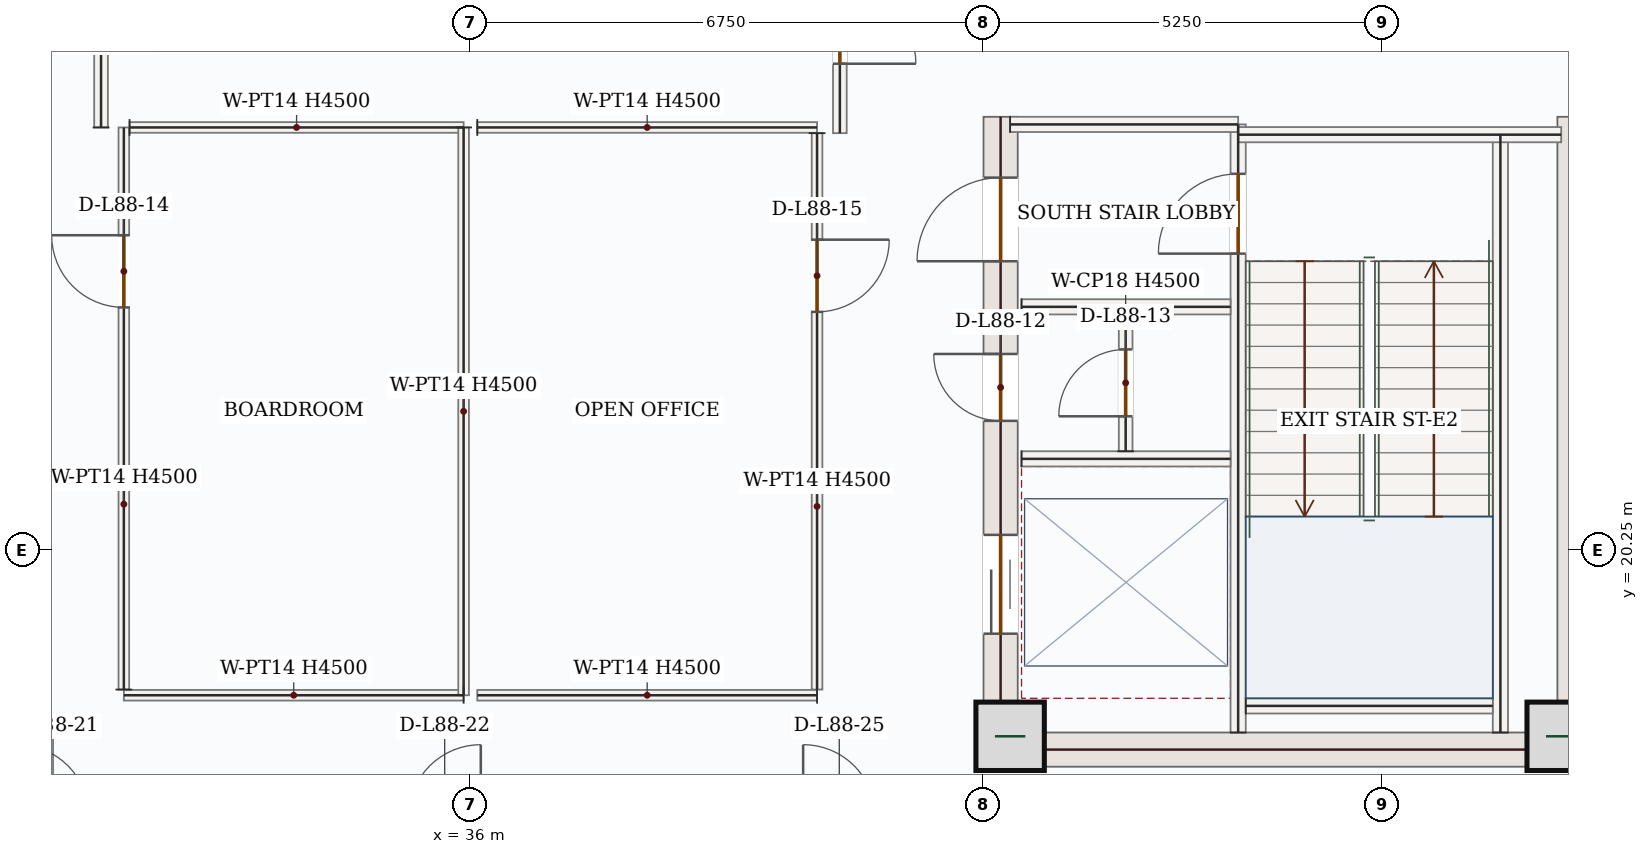
"""IFC4 building model, lengths in metres.
Left out: names, types, materials, properties, quantities, classifications, styles, units other than length and angle.
Written with IfcOpenShell. Run it as: python <this file> out.ifc"""

import sys

from ifc_helpers import new_model, si_unit, direction, frame, frame_2d, origin, origin_2d, place, context, subcontext, project, spatial, rectangle, extrude, source, transform, mapped, element, fill, save


model = new_model("IFC4")
c1 = context("Model", 3, precision=1e-05, world=origin(), true_north=direction((0.0, 1.0)))
c2 = subcontext(c1, "Body", "Model", "MODEL_VIEW")
j1 = project(units=[si_unit("LENGTHUNIT", "METRE"), si_unit("PLANEANGLEUNIT", "RADIAN")], contexts=[c1])
p1 = place(None, origin())
s1 = spatial("IfcSite", under=j1, at=p1, CompositionType="ELEMENT")
p2 = place(p1, origin())
s2 = spatial("IfcBuilding", under=s1, at=p2, CompositionType="ELEMENT")
p3 = place(p2, frame((0.0, 0.0, 361.05)))
s3 = spatial("IfcBuildingStorey", under=s2, at=p3, CompositionType="ELEMENT", Elevation=361.05)
p4 = place(p3, frame((42.975, 17.4, 0.0), z_axis=(0.0, 0.0, 1.0), x_axis=(0.0, 1.0, 0.0)))
e1 = element("IfcWall", 1, at=p4, inside=s3, PredefinedType="SHEAR", context=c2, shape_type="SweptSolid", body=[
    extrude(rectangle(XDim=8.55, YDim=0.45, at=frame_2d((4.275, 0.0))), origin(), (0.0, 0.0, 1.0), 4.5),
])
p5 = place(p4, frame((6.65, 0.0, 0.0)))
e2 = element("IfcOpeningElement", 2, at=p5, cuts=e1, PredefinedType="OPENING", context=c2, shape_type="SweptSolid", body=[
    extrude(rectangle(XDim=1.1, YDim=2.2, at=frame_2d((0.55, 1.1))), frame((0.0, 0.235, 0.0), z_axis=(0.0, -1.0, 0.0), x_axis=(1.0, 0.0, 0.0)), (0.0, 0.0, 1.0), 0.47),
])
p6 = place(p4, frame((1.75, 0.0, 0.0)))
e3 = element("IfcOpeningElement", 3, at=p6, cuts=e1, PredefinedType="OPENING", context=c2, shape_type="SweptSolid", body=[
    extrude(rectangle(XDim=1.3, YDim=2.2, at=frame_2d((0.65, 1.1))), frame((0.0, 0.235, 0.0), z_axis=(0.0, -1.0, 0.0), x_axis=(1.0, 0.0, 0.0)), (0.0, 0.0, 1.0), 0.47),
])
p7 = place(p4, frame((4.55, 0.0, 0.0)))
e4 = element("IfcOpeningElement", 4, at=p7, cuts=e1, PredefinedType="OPENING", context=c2, shape_type="SweptSolid", body=[
    extrude(rectangle(XDim=0.88, YDim=2.1, at=frame_2d((0.44, 1.05))), frame((0.0, 0.235, 0.0), z_axis=(0.0, -1.0, 0.0), x_axis=(1.0, 0.0, 0.0)), (0.0, 0.0, 1.0), 0.47),
])
m1 = source(origin(), c2, "Body", "SweptSolid", [
    extrude(rectangle(XDim=8.55, YDim=0.45, at=frame_2d((4.275, 0.0))), origin(), (0.0, 0.0, 1.0), 4.5),
])
p8 = place(p3, frame((50.525, 17.4, 0.0), z_axis=(0.0, 0.0, 1.0), x_axis=(0.0, 1.0, 0.0)))
e5 = element("IfcWall", 5, at=p8, inside=s3, PredefinedType="SHEAR", context=c2, shape_type="MappedRepresentation", body=[
    mapped(m1, transform((0.0, 0.0, 0.0), x_axis=(1.0, 0.0, 0.0), y_axis=(0.0, 1.0, 0.0), z_axis=(0.0, 0.0, 1.0), scale=1.0)),
])
m2 = source(origin(), c2, "Body", "SweptSolid", [
    extrude(rectangle(XDim=7.1, YDim=0.45, at=frame_2d((3.55, 0.0))), origin(), (0.0, 0.0, 1.0), 4.5),
])
p9 = place(p3, frame((43.2, 17.625, 0.0), z_axis=(0.0, 0.0, 1.0), x_axis=(1.0, 0.0, 0.0)))
e6 = element("IfcWall", 6, at=p9, inside=s3, PredefinedType="SHEAR", context=c2, shape_type="MappedRepresentation", body=[
    mapped(m2, transform((0.0, 0.0, 0.0), x_axis=(1.0, 0.0, 0.0), y_axis=(0.0, 1.0, 0.0), z_axis=(0.0, 0.0, 1.0), scale=1.0)),
])
m3 = source(origin(), c2, "Body", "SweptSolid", [
    extrude(rectangle(XDim=0.9, YDim=0.9, at=origin_2d()), origin(), (0.0, 0.0, 1.0), 4.8),
])
for number, where, z_axis, x_axis in (
    (7, (43.1, 17.8, 0.0), (0.0, 0.0, 1.0), (1.0, 0.0, 0.0)),
    (8, (50.35, 17.8, 0.0), (0.0, 0.0, 1.0), (1.0, 0.0, 0.0)),
):
    element("IfcColumn", number, at=place(p3, frame(where, z_axis=z_axis, x_axis=x_axis)), inside=s3, PredefinedType="COLUMN", context=c2, shape_type="MappedRepresentation", body=[
        mapped(m3, transform((0.0, 0.0, 0.0), x_axis=(1.0, 0.0, 0.0), y_axis=(0.0, 1.0, 0.0), z_axis=(0.0, 0.0, 1.0), scale=1.0)),
    ])
m4 = source(origin(), c2, "Body", "SweptSolid", [
    extrude(rectangle(XDim=7.87, YDim=0.2, at=frame_2d((3.935, 0.0))), origin(), (0.0, 0.0, 1.0), 4.5),
])
p10 = place(p3, frame((49.55, 17.85, 0.0), z_axis=(0.0, 0.0, 1.0), x_axis=(0.0, 1.0, 0.0)))
e9 = element("IfcWall", 9, at=p10, inside=s3, PredefinedType="SOLIDWALL", context=c2, shape_type="MappedRepresentation", body=[
    mapped(m4, transform((0.0, 0.0, 0.0), x_axis=(1.0, 0.0, 0.0), y_axis=(0.0, 1.0, 0.0), z_axis=(0.0, 0.0, 1.0), scale=1.0)),
])
p11 = place(p3, frame((46.1, 17.85, 0.0), z_axis=(0.0, 0.0, 1.0), x_axis=(0.0, 1.0, 0.0)))
e10 = element("IfcWall", 10, at=p11, inside=s3, PredefinedType="SOLIDWALL", context=c2, shape_type="SweptSolid", body=[
    extrude(rectangle(XDim=8.0, YDim=0.2, at=frame_2d((4.0, 0.0))), origin(), (0.0, 0.0, 1.0), 4.5),
])
p12 = place(p11, frame((6.3, 0.0, 0.0)))
e11 = element("IfcOpeningElement", 11, at=p12, cuts=e10, PredefinedType="OPENING", context=c2, shape_type="SweptSolid", body=[
    extrude(rectangle(XDim=1.05, YDim=2.15, at=frame_2d((0.525, 1.075))), frame((0.0, 0.11, 0.0), z_axis=(0.0, -1.0, 0.0), x_axis=(1.0, 0.0, 0.0)), (0.0, 0.0, 1.0), 0.22),
])
m5 = source(origin(), c2, "Body", "SweptSolid", [
    extrude(rectangle(XDim=3.0, YDim=0.2, at=frame_2d((1.5, 0.0))), origin(), (0.0, 0.0, 1.0), 4.5),
])
p13 = place(p3, frame((43.1, 25.85, 0.0), z_axis=(0.0, 0.0, 1.0), x_axis=(1.0, 0.0, 0.0)))
e12 = element("IfcWall", 12, at=p13, inside=s3, PredefinedType="SOLIDWALL", context=c2, shape_type="MappedRepresentation", body=[
    mapped(m5, transform((0.0, 0.0, 0.0), x_axis=(1.0, 0.0, 0.0), y_axis=(0.0, 1.0, 0.0), z_axis=(0.0, 0.0, 1.0), scale=1.0)),
])
m6 = source(origin(), c2, "Body", "SweptSolid", [
    extrude(rectangle(XDim=4.25, YDim=0.2, at=frame_2d((2.125, 0.0))), origin(), (0.0, 0.0, 1.0), 4.5),
])
p14 = place(p3, frame((46.1, 25.715, 0.0), z_axis=(0.0, 0.0, 1.0), x_axis=(1.0, 0.0, 0.0)))
e13 = element("IfcWall", 13, at=p14, inside=s3, PredefinedType="SOLIDWALL", context=c2, shape_type="MappedRepresentation", body=[
    mapped(m6, transform((0.0, 0.0, 0.0), x_axis=(1.0, 0.0, 0.0), y_axis=(0.0, 1.0, 0.0), z_axis=(0.0, 0.0, 1.0), scale=1.0)),
])
m7 = source(origin(), c2, "Body", "SweptSolid", [
    extrude(rectangle(XDim=3.25, YDim=0.2, at=frame_2d((1.625, 0.0))), origin(), (0.0, 0.0, 1.0), 4.5),
])
p15 = place(p3, frame((46.2, 18.2, 0.0), z_axis=(0.0, 0.0, 1.0), x_axis=(1.0, 0.0, 0.0)))
e14 = element("IfcWall", 14, at=p15, inside=s3, PredefinedType="SOLIDWALL", context=c2, shape_type="MappedRepresentation", body=[
    mapped(m7, transform((0.0, 0.0, 0.0), x_axis=(1.0, 0.0, 0.0), y_axis=(0.0, 1.0, 0.0), z_axis=(0.0, 0.0, 1.0), scale=1.0)),
])
m8 = source(origin(), c2, "Body", "SweptSolid", [
    extrude(rectangle(XDim=2.75, YDim=0.2, at=frame_2d((1.375, 0.0))), origin(), (0.0, 0.0, 1.0), 4.5),
])
for number, where, z_axis, x_axis in (
    (15, (43.25, 23.45, 0.0), (0.0, 0.0, 1.0), (1.0, 0.0, 0.0)),
    (16, (43.25, 21.45, 0.0), (0.0, 0.0, 1.0), (1.0, 0.0, 0.0)),
):
    element("IfcWall", number, at=place(p3, frame(where, z_axis=z_axis, x_axis=x_axis)), inside=s3, PredefinedType="SOLIDWALL", context=c2, shape_type="MappedRepresentation", body=[
        mapped(m8, transform((0.0, 0.0, 0.0), x_axis=(1.0, 0.0, 0.0), y_axis=(0.0, 1.0, 0.0), z_axis=(0.0, 0.0, 1.0), scale=1.0)),
    ])
p16 = place(p3, frame((44.62, 21.55, 0.0), z_axis=(0.0, 0.0, 1.0), x_axis=(0.0, 1.0, 0.0)))
e17 = element("IfcWall", 17, at=p16, inside=s3, PredefinedType="PARTITIONING", context=c2, shape_type="SweptSolid", body=[
    extrude(rectangle(XDim=1.8, YDim=0.18, at=frame_2d((0.9, 0.0))), origin(), (0.0, 0.0, 1.0), 4.5),
])
p17 = place(p16, frame((0.46, 0.0, 0.0)))
e18 = element("IfcOpeningElement", 18, at=p17, cuts=e17, PredefinedType="OPENING", context=c2, shape_type="SweptSolid", body=[
    extrude(rectangle(XDim=0.88, YDim=2.1, at=frame_2d((0.44, 1.05))), frame((0.0, 0.1, 0.0), z_axis=(0.0, -1.0, 0.0), x_axis=(1.0, 0.0, 0.0)), (0.0, 0.0, 1.0), 0.2),
])
m9 = source(origin(), c2, "Body", "SweptSolid", [
    extrude(rectangle(XDim=4.47, YDim=0.14, at=frame_2d((2.235, 0.0))), origin(), (0.0, 0.0, 1.0), 4.5),
])
p18 = place(p3, frame((35.91, 18.34, 0.0), z_axis=(0.0, 0.0, 1.0), x_axis=(-1.0, 0.0, 0.0)))
e19 = element("IfcWall", 19, at=p18, inside=s3, PredefinedType="PARTITIONING", context=c2, shape_type="MappedRepresentation", body=[
    mapped(m9, transform((0.0, 0.0, 0.0), x_axis=(1.0, 0.0, 0.0), y_axis=(0.0, 1.0, 0.0), z_axis=(0.0, 0.0, 1.0), scale=1.0)),
])
p19 = place(p3, frame((31.44, 18.415, 0.0), z_axis=(0.0, 0.0, 1.0), x_axis=(0.0, 1.0, 0.0)))
e20 = element("IfcWall", 20, at=p19, inside=s3, PredefinedType="PARTITIONING", context=c2, shape_type="SweptSolid", body=[
    extrude(rectangle(XDim=7.395, YDim=0.14, at=frame_2d((3.698, 0.0))), origin(), (0.0, 0.0, 1.0), 4.5),
])
p20 = place(p19, frame((5.027, 0.0, 0.0)))
e21 = element("IfcOpeningElement", 21, at=p20, cuts=e20, PredefinedType="OPENING", context=c2, shape_type="SweptSolid", body=[
    extrude(rectangle(XDim=0.95, YDim=2.15, at=frame_2d((0.475, 1.075))), frame((0.0, 0.08, 0.0), z_axis=(0.0, -1.0, 0.0), x_axis=(1.0, 0.0, 0.0)), (0.0, 0.0, 1.0), 0.16),
])
m10 = source(origin(), c2, "Body", "SweptSolid", [
    extrude(rectangle(XDim=4.395, YDim=0.14, at=frame_2d((2.198, 0.0))), origin(), (0.0, 0.0, 1.0), 4.5),
])
p21 = place(p3, frame((31.515, 25.81, 0.0), z_axis=(0.0, 0.0, 1.0), x_axis=(1.0, 0.0, 0.0)))
e22 = element("IfcWall", 22, at=p21, inside=s3, PredefinedType="PARTITIONING", context=c2, shape_type="MappedRepresentation", body=[
    mapped(m10, transform((0.0, 0.0, 0.0), x_axis=(1.0, 0.0, 0.0), y_axis=(0.0, 1.0, 0.0), z_axis=(0.0, 0.0, 1.0), scale=1.0)),
])
m11 = source(origin(), c2, "Body", "SweptSolid", [
    extrude(rectangle(XDim=7.47, YDim=0.14, at=frame_2d((3.735, 0.0))), origin(), (0.0, 0.0, 1.0), 4.5),
])
p22 = place(p3, frame((35.91, 25.81, 0.0), z_axis=(0.0, 0.0, 1.0), x_axis=(0.0, -1.0, 0.0)))
e23 = element("IfcWall", 23, at=p22, inside=s3, PredefinedType="PARTITIONING", context=c2, shape_type="MappedRepresentation", body=[
    mapped(m11, transform((0.0, 0.0, 0.0), x_axis=(1.0, 0.0, 0.0), y_axis=(0.0, 1.0, 0.0), z_axis=(0.0, 0.0, 1.0), scale=1.0)),
])
for number, where, z_axis, x_axis in (
    (24, (40.56, 18.34, 0.0), (0.0, 0.0, 1.0), (-1.0, 0.0, 0.0)),
    (25, (36.09, 25.81, 0.0), (0.0, 0.0, 1.0), (1.0, 0.0, 0.0)),
):
    element("IfcWall", number, at=place(p3, frame(where, z_axis=z_axis, x_axis=x_axis)), inside=s3, PredefinedType="PARTITIONING", context=c2, shape_type="MappedRepresentation", body=[
        mapped(m9, transform((0.0, 0.0, 0.0), x_axis=(1.0, 0.0, 0.0), y_axis=(0.0, 1.0, 0.0), z_axis=(0.0, 0.0, 1.0), scale=1.0)),
    ])
p23 = place(p3, frame((40.56, 25.735, 0.0), z_axis=(0.0, 0.0, 1.0), x_axis=(0.0, -1.0, 0.0)))
e26 = element("IfcWall", 26, at=p23, inside=s3, PredefinedType="PARTITIONING", context=c2, shape_type="SweptSolid", body=[
    extrude(rectangle(XDim=7.32, YDim=0.14, at=frame_2d((3.66, 0.0))), origin(), (0.0, 0.0, 1.0), 4.5),
])
p24 = place(p23, frame((1.401, 0.0, 0.0)))
e27 = element("IfcOpeningElement", 27, at=p24, cuts=e26, PredefinedType="OPENING", context=c2, shape_type="SweptSolid", body=[
    extrude(rectangle(XDim=0.95, YDim=2.15, at=frame_2d((0.475, 1.075))), frame((0.0, 0.08, 0.0), z_axis=(0.0, -1.0, 0.0), x_axis=(1.0, 0.0, 0.0)), (0.0, 0.0, 1.0), 0.16),
])
m12 = source(origin(), c2, "Body", "SweptSolid", [
    extrude(rectangle(XDim=5.14, YDim=0.18, at=frame_2d((2.57, 0.0))), origin(), (0.0, 0.0, 1.0), 4.5),
])
p25 = place(p3, frame((31.14, 25.81, 0.0), z_axis=(0.0, 0.0, 1.0), x_axis=(0.0, 1.0, 0.0)))
e28 = element("IfcWall", 28, at=p25, inside=s3, PredefinedType="PARTITIONING", context=c2, shape_type="MappedRepresentation", body=[
    mapped(m12, transform((0.0, 0.0, 0.0), x_axis=(1.0, 0.0, 0.0), y_axis=(0.0, 1.0, 0.0), z_axis=(0.0, 0.0, 1.0), scale=1.0)),
])
p26 = place(p3, frame((40.86, 30.95, 0.0), z_axis=(0.0, 0.0, 1.0), x_axis=(0.0, -1.0, 0.0)))
e29 = element("IfcWall", 29, at=p26, inside=s3, PredefinedType="PARTITIONING", context=c2, shape_type="SweptSolid", body=[
    extrude(rectangle(XDim=5.215, YDim=0.18, at=frame_2d((2.607, 0.0))), origin(), (0.0, 0.0, 1.0), 4.5),
])
p27 = place(p26, frame((3.302, 0.0, 0.0)))
e30 = element("IfcOpeningElement", 30, at=p27, cuts=e29, PredefinedType="OPENING", context=c2, shape_type="SweptSolid", body=[
    extrude(rectangle(XDim=1.0, YDim=2.15, at=frame_2d((0.5, 1.075))), frame((0.0, 0.1, 0.0), z_axis=(0.0, -1.0, 0.0), x_axis=(1.0, 0.0, 0.0)), (0.0, 0.0, 1.0), 0.2),
])
m13 = source(origin(), c2, "Body", "SweptSolid", [
    extrude(rectangle(XDim=1.05, YDim=2.15, at=frame_2d((0.525, 1.075))), frame((0.0, 0.025, 0.0), z_axis=(0.0, -1.0, 0.0), x_axis=(1.0, 0.0, 0.0)), (0.0, 0.0, 1.0), 0.05),
])
p28 = place(p12, origin())
e31 = element("IfcDoor", 31, at=p28, inside=s3, OperationType="SINGLE_SWING_LEFT", PredefinedType="DOOR", context=c2, shape_type="MappedRepresentation", body=[
    mapped(m13, transform((0.0, 0.0, 0.0), x_axis=(1.0, 0.0, 0.0), y_axis=(0.0, 1.0, 0.0), z_axis=(0.0, 0.0, 1.0), scale=1.0)),
])
fill(e11, e31)
m14 = source(origin(), c2, "Body", "SweptSolid", [
    extrude(rectangle(XDim=1.1, YDim=2.2, at=frame_2d((0.55, 1.1))), frame((0.0, 0.025, 0.0), z_axis=(0.0, -1.0, 0.0), x_axis=(1.0, 0.0, 0.0)), (0.0, 0.0, 1.0), 0.05),
])
p29 = place(p5, origin())
e32 = element("IfcDoor", 32, at=p29, inside=s3, OperationType="SINGLE_SWING_LEFT", PredefinedType="DOOR", context=c2, shape_type="MappedRepresentation", body=[
    mapped(m14, transform((0.0, 0.0, 0.0), x_axis=(1.0, 0.0, 0.0), y_axis=(0.0, 1.0, 0.0), z_axis=(0.0, 0.0, 1.0), scale=1.0)),
])
fill(e2, e32)
m15 = source(origin(), c2, "Body", "SweptSolid", [
    extrude(rectangle(XDim=1.3, YDim=2.2, at=frame_2d((0.65, 1.1))), frame((0.0, 0.025, 0.0), z_axis=(0.0, -1.0, 0.0), x_axis=(1.0, 0.0, 0.0)), (0.0, 0.0, 1.0), 0.05),
])
p30 = place(p6, origin())
e33 = element("IfcDoor", 33, at=p30, inside=s3, OperationType="DOUBLE_DOOR_SLIDING", PredefinedType="DOOR", context=c2, shape_type="MappedRepresentation", body=[
    mapped(m15, transform((0.0, 0.0, 0.0), x_axis=(1.0, 0.0, 0.0), y_axis=(0.0, 1.0, 0.0), z_axis=(0.0, 0.0, 1.0), scale=1.0)),
])
fill(e3, e33)
m16 = source(origin(), c2, "Body", "SweptSolid", [
    extrude(rectangle(XDim=0.88, YDim=2.1, at=frame_2d((0.44, 1.05))), frame((0.0, 0.025, 0.0), z_axis=(0.0, -1.0, 0.0), x_axis=(1.0, 0.0, 0.0)), (0.0, 0.0, 1.0), 0.05),
])
p31 = place(p7, origin())
e34 = element("IfcDoor", 34, at=p31, inside=s3, OperationType="SINGLE_SWING_RIGHT", PredefinedType="DOOR", context=c2, shape_type="MappedRepresentation", body=[
    mapped(m16, transform((0.0, 0.0, 0.0), x_axis=(1.0, 0.0, 0.0), y_axis=(0.0, 1.0, 0.0), z_axis=(0.0, 0.0, 1.0), scale=1.0)),
])
fill(e4, e34)
p32 = place(p17, origin())
e35 = element("IfcDoor", 35, at=p32, inside=s3, OperationType="SINGLE_SWING_LEFT", PredefinedType="DOOR", context=c2, shape_type="MappedRepresentation", body=[
    mapped(m16, transform((0.0, 0.0, 0.0), x_axis=(1.0, 0.0, 0.0), y_axis=(0.0, 1.0, 0.0), z_axis=(0.0, 0.0, 1.0), scale=1.0)),
])
fill(e18, e35)
m17 = source(origin(), c2, "Body", "SweptSolid", [
    extrude(rectangle(XDim=0.95, YDim=2.15, at=frame_2d((0.475, 1.075))), frame((0.0, 0.025, 0.0), z_axis=(0.0, -1.0, 0.0), x_axis=(1.0, 0.0, 0.0)), (0.0, 0.0, 1.0), 0.05),
])
p33 = place(p20, origin())
e36 = element("IfcDoor", 36, at=p33, inside=s3, OperationType="SINGLE_SWING_RIGHT", PredefinedType="DOOR", context=c2, shape_type="MappedRepresentation", body=[
    mapped(m17, transform((0.0, 0.0, 0.0), x_axis=(1.0, 0.0, 0.0), y_axis=(0.0, 1.0, 0.0), z_axis=(0.0, 0.0, 1.0), scale=1.0)),
])
fill(e21, e36)
p34 = place(p24, origin())
e37 = element("IfcDoor", 37, at=p34, inside=s3, OperationType="SINGLE_SWING_LEFT", PredefinedType="DOOR", context=c2, shape_type="MappedRepresentation", body=[
    mapped(m17, transform((0.0, 0.0, 0.0), x_axis=(1.0, 0.0, 0.0), y_axis=(0.0, 1.0, 0.0), z_axis=(0.0, 0.0, 1.0), scale=1.0)),
])
fill(e27, e37)
m18 = source(origin(), c2, "Body", "SweptSolid", [
    extrude(rectangle(XDim=1.0, YDim=2.15, at=frame_2d((0.5, 1.075))), frame((0.0, 0.025, 0.0), z_axis=(0.0, -1.0, 0.0), x_axis=(1.0, 0.0, 0.0)), (0.0, 0.0, 1.0), 0.05),
])
p35 = place(p27, origin())
e38 = element("IfcDoor", 38, at=p35, inside=s3, OperationType="SINGLE_SWING_RIGHT", PredefinedType="DOOR", context=c2, shape_type="MappedRepresentation", body=[
    mapped(m18, transform((0.0, 0.0, 0.0), x_axis=(1.0, 0.0, 0.0), y_axis=(0.0, 1.0, 0.0), z_axis=(0.0, 0.0, 1.0), scale=1.0)),
])
fill(e30, e38)
save(model, sys.argv[1])
